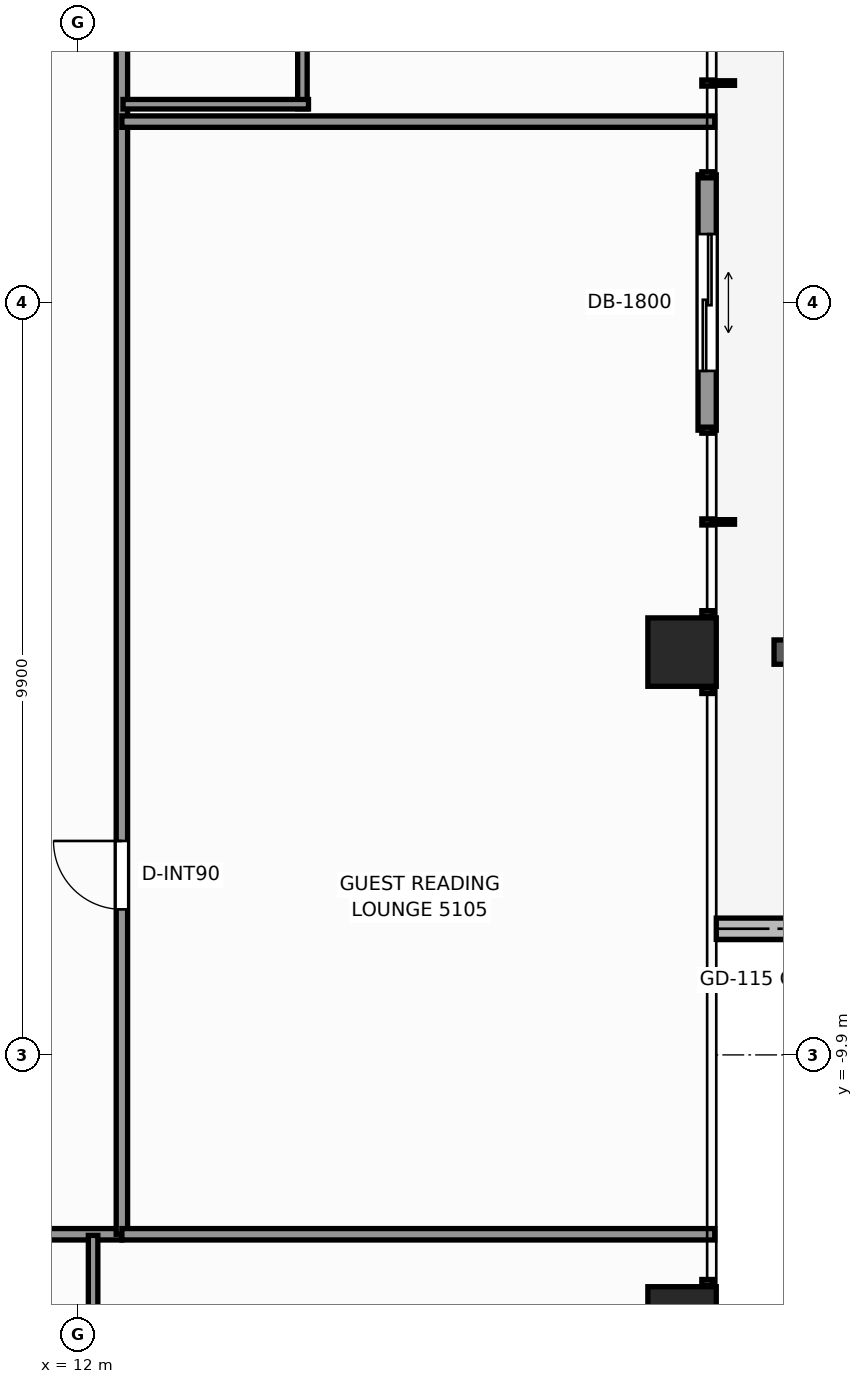
"""IFC4 building model, lengths in metres.
Left out: names, types, materials, properties, quantities, classifications, styles, units other than length and angle.
Written with IfcOpenShell. Run it as: python <this file> out.ifc"""

import sys

from ifc_helpers import new_model, si_unit, direction, frame, frame_2d, origin, origin_2d, place, context, subcontext, project, spatial, rectangle, extrude, element, fill, save


model = new_model("IFC4")
c1 = context("Model", 3, precision=1e-05, world=origin(), true_north=direction((0.0, 1.0)))
c2 = subcontext(c1, "Body", "Model", "MODEL_VIEW")
j1 = project(units=[si_unit("LENGTHUNIT", "METRE"), si_unit("PLANEANGLEUNIT", "RADIAN")], contexts=[c1])
p1 = place(None, origin())
s1 = spatial("IfcSite", under=j1, at=p1, CompositionType="ELEMENT")
p2 = place(p1, origin())
s2 = spatial("IfcBuilding", under=s1, at=p2, CompositionType="ELEMENT")
p3 = place(p2, frame((0.0, 0.0, 176.7)))
s3 = spatial("IfcBuildingStorey", under=s2, at=p3, CompositionType="ELEMENT", Elevation=176.7)
for number, where, z_axis, x_axis in (
    (1, (19.95, -13.4, 0.0), (0.0, 0.0, 1.0), (1.0, 0.0, 0.0)),
    (2, (19.95, -4.6, 0.0), (0.0, 0.0, 1.0), (1.0, 0.0, 0.0)),
):
    element("IfcColumn", number, at=place(p3, frame(where, z_axis=z_axis, x_axis=x_axis)), inside=s3, PredefinedType="COLUMN", context=c2, shape_type="SweptSolid", body=[
        extrude(rectangle(XDim=0.9, YDim=0.9, at=origin_2d()), origin(), (0.0, 0.0, 1.0), 3.3),
    ])
p4 = place(p3, frame((20.4, -8.24, -0.04), z_axis=(0.0, 0.0, 1.0), x_axis=(1.0, 0.0, 0.0)))
e3 = element("IfcWall", 3, at=p4, inside=s3, PredefinedType="PARAPET", context=c2, shape_type="SweptSolid", body=[
    extrude(rectangle(XDim=1.313, YDim=0.28, at=frame_2d((0.656, 0.0))), origin(), (0.0, 0.0, 1.0), 0.42),
])
p5 = place(p3, frame((20.28, 1.68, 0.0), z_axis=(0.0, 0.0, 1.0), x_axis=(0.0, -1.0, 0.0)))
e4 = element("IfcWall", 4, at=p5, inside=s3, PredefinedType="STANDARD", context=c2, shape_type="SweptSolid", body=[
    extrude(rectangle(XDim=3.36, YDim=0.24, at=frame_2d((1.68, 0.0))), origin(), (0.0, 0.0, 1.0), 3.08),
])
p6 = place(p5, frame((0.78, 0.0, 0.0)))
e5 = element("IfcOpeningElement", 5, at=p6, cuts=e4, PredefinedType="OPENING", context=c2, shape_type="SweptSolid", body=[
    extrude(rectangle(XDim=1.8, YDim=2.2, at=frame_2d((0.9, 1.1))), frame((0.0, 0.13, 0.0), z_axis=(0.0, -1.0, 0.0), x_axis=(1.0, 0.0, 0.0)), (0.0, 0.0, 1.0), 0.26),
])
p7 = place(p3, frame((-12.26, -12.26, 0.0), z_axis=(0.0, 0.0, 1.0), x_axis=(1.0, 0.0, 0.0)))
e6 = element("IfcWall", 6, at=p7, inside=s3, PredefinedType="PARTITIONING", context=c2, shape_type="SweptSolid", body=[
    extrude(rectangle(XDim=24.84, YDim=0.15, at=frame_2d((12.42, 0.0))), origin(), (0.0, 0.0, 1.0), 2.369),
])
p8 = place(p7, frame((2.944, 0.0, 0.0)))
e7 = element("IfcOpeningElement", 7, at=p8, cuts=e6, PredefinedType="OPENING", context=c2, shape_type="SweptSolid", body=[
    extrude(rectangle(XDim=0.9, YDim=2.06, at=frame_2d((0.45, 1.03))), frame((0.0, 0.085, 0.0), z_axis=(0.0, -1.0, 0.0), x_axis=(1.0, 0.0, 0.0)), (0.0, 0.0, 1.0), 0.17),
])
p9 = place(p7, frame((4.945, 0.0, 0.0)))
e8 = element("IfcOpeningElement", 8, at=p9, cuts=e6, PredefinedType="OPENING", context=c2, shape_type="SweptSolid", body=[
    extrude(rectangle(XDim=0.9, YDim=2.06, at=frame_2d((0.45, 1.03))), frame((0.0, 0.085, 0.0), z_axis=(0.0, -1.0, 0.0), x_axis=(1.0, 0.0, 0.0)), (0.0, 0.0, 1.0), 0.17),
])
p10 = place(p7, frame((8.611, 0.0, 0.0)))
e9 = element("IfcOpeningElement", 9, at=p10, cuts=e6, PredefinedType="OPENING", context=c2, shape_type="SweptSolid", body=[
    extrude(rectangle(XDim=0.95, YDim=2.06, at=frame_2d((0.475, 1.03))), frame((0.0, 0.085, 0.0), z_axis=(0.0, -1.0, 0.0), x_axis=(1.0, 0.0, 0.0)), (0.0, 0.0, 1.0), 0.17),
])
p11 = place(p7, frame((13.84, 0.0, 0.0)))
e10 = element("IfcOpeningElement", 10, at=p11, cuts=e6, PredefinedType="OPENING", context=c2, shape_type="SweptSolid", body=[
    extrude(rectangle(XDim=0.9, YDim=2.06, at=frame_2d((0.45, 1.03))), frame((0.0, 0.085, 0.0), z_axis=(0.0, -1.0, 0.0), x_axis=(1.0, 0.0, 0.0)), (0.0, 0.0, 1.0), 0.17),
])
p12 = place(p7, frame((18.5, 0.0, 0.0)))
e11 = element("IfcOpeningElement", 11, at=p12, cuts=e6, PredefinedType="OPENING", context=c2, shape_type="SweptSolid", body=[
    extrude(rectangle(XDim=0.9, YDim=2.06, at=frame_2d((0.45, 1.03))), frame((0.0, 0.085, 0.0), z_axis=(0.0, -1.0, 0.0), x_axis=(1.0, 0.0, 0.0)), (0.0, 0.0, 1.0), 0.17),
])
p13 = place(p7, frame((20.552, 0.0, 0.0)))
e12 = element("IfcOpeningElement", 12, at=p13, cuts=e6, PredefinedType="OPENING", context=c2, shape_type="SweptSolid", body=[
    extrude(rectangle(XDim=0.95, YDim=2.06, at=frame_2d((0.475, 1.03))), frame((0.0, 0.085, 0.0), z_axis=(0.0, -1.0, 0.0), x_axis=(1.0, 0.0, 0.0)), (0.0, 0.0, 1.0), 0.17),
])
p14 = place(p3, frame((12.58, -12.26, 0.0), z_axis=(0.0, 0.0, 1.0), x_axis=(0.0, 1.0, 0.0)))
e13 = element("IfcWall", 13, at=p14, inside=s3, PredefinedType="PARTITIONING", context=c2, shape_type="SweptSolid", body=[
    extrude(rectangle(XDim=24.84, YDim=0.15, at=frame_2d((12.42, 0.0))), origin(), (0.0, 0.0, 1.0), 2.369),
])
p15 = place(p14, frame((4.275, 0.0, 0.0)))
e14 = element("IfcOpeningElement", 14, at=p15, cuts=e13, PredefinedType="OPENING", context=c2, shape_type="SweptSolid", body=[
    extrude(rectangle(XDim=0.9, YDim=2.06, at=frame_2d((0.45, 1.03))), frame((0.0, 0.085, 0.0), z_axis=(0.0, -1.0, 0.0), x_axis=(1.0, 0.0, 0.0)), (0.0, 0.0, 1.0), 0.17),
])
p16 = place(p14, frame((19.32, 0.0, 0.0)))
e15 = element("IfcOpeningElement", 15, at=p16, cuts=e13, PredefinedType="OPENING", context=c2, shape_type="SweptSolid", body=[
    extrude(rectangle(XDim=0.95, YDim=2.06, at=frame_2d((0.475, 1.03))), frame((0.0, 0.085, 0.0), z_axis=(0.0, -1.0, 0.0), x_axis=(1.0, 0.0, 0.0)), (0.0, 0.0, 1.0), 0.17),
])
p17 = place(p3, frame((12.58, -12.26, 0.0), z_axis=(0.0, 0.0, 1.0), x_axis=(1.0, 0.0, 0.0)))
e16 = element("IfcWall", 16, at=p17, inside=s3, PredefinedType="PARTITIONING", context=c2, shape_type="SweptSolid", body=[
    extrude(rectangle(XDim=7.8, YDim=0.15, at=frame_2d((3.9, 0.0))), origin(), (0.0, 0.0, 1.0), 2.369),
])
p18 = place(p3, frame((12.201, -14.715, 0.0), z_axis=(0.0, 0.0, 1.0), x_axis=(0.0, 1.0, 0.0)))
e17 = element("IfcWall", 17, at=p18, inside=s3, PredefinedType="PARTITIONING", context=c2, shape_type="SweptSolid", body=[
    extrude(rectangle(XDim=2.44, YDim=0.125, at=frame_2d((1.22, 0.0))), origin(), (0.0, 0.0, 1.0), 3.08),
])
p19 = place(p3, frame((12.58, 2.38, 0.0), z_axis=(0.0, 0.0, 1.0), x_axis=(1.0, 0.0, 0.0)))
e18 = element("IfcWall", 18, at=p19, inside=s3, PredefinedType="PARTITIONING", context=c2, shape_type="SweptSolid", body=[
    extrude(rectangle(XDim=7.8, YDim=0.15, at=frame_2d((3.9, 0.0))), origin(), (0.0, 0.0, 1.0), 2.453),
])
p20 = place(p3, frame((14.955, 2.549, 0.0), z_axis=(0.0, 0.0, 1.0), x_axis=(0.0, 1.0, 0.0)))
e19 = element("IfcWall", 19, at=p20, inside=s3, PredefinedType="PARTITIONING", context=c2, shape_type="SweptSolid", body=[
    extrude(rectangle(XDim=2.27, YDim=0.125, at=frame_2d((1.135, 0.0))), origin(), (0.0, 0.0, 1.0), 2.369),
])
p21 = place(p3, frame((12.595, 2.609, 0.0), z_axis=(0.0, 0.0, 1.0), x_axis=(1.0, 0.0, 0.0)))
e20 = element("IfcWall", 20, at=p21, inside=s3, PredefinedType="PARTITIONING", context=c2, shape_type="SweptSolid", body=[
    extrude(rectangle(XDim=2.44, YDim=0.125, at=frame_2d((1.22, 0.0))), origin(), (0.0, 0.0, 1.0), 3.08),
])
p22 = place(p6, origin())
e21 = element("IfcDoor", 21, at=p22, inside=s3, OperationType="DOUBLE_DOOR_SLIDING", PredefinedType="DOOR", context=c2, shape_type="SweptSolid", body=[
    extrude(rectangle(XDim=1.8, YDim=2.2, at=frame_2d((0.9, 1.1))), frame((0.0, 0.025, 0.0), z_axis=(0.0, -1.0, 0.0), x_axis=(1.0, 0.0, 0.0)), (0.0, 0.0, 1.0), 0.05),
])
fill(e5, e21)
p23 = place(p15, origin())
e22 = element("IfcDoor", 22, at=p23, inside=s3, OperationType="SINGLE_SWING_RIGHT", PredefinedType="DOOR", context=c2, shape_type="SweptSolid", body=[
    extrude(rectangle(XDim=0.9, YDim=2.06, at=frame_2d((0.45, 1.03))), frame((0.0, 0.025, 0.0), z_axis=(0.0, -1.0, 0.0), x_axis=(1.0, 0.0, 0.0)), (0.0, 0.0, 1.0), 0.05),
])
fill(e14, e22)
save(model, sys.argv[1])
